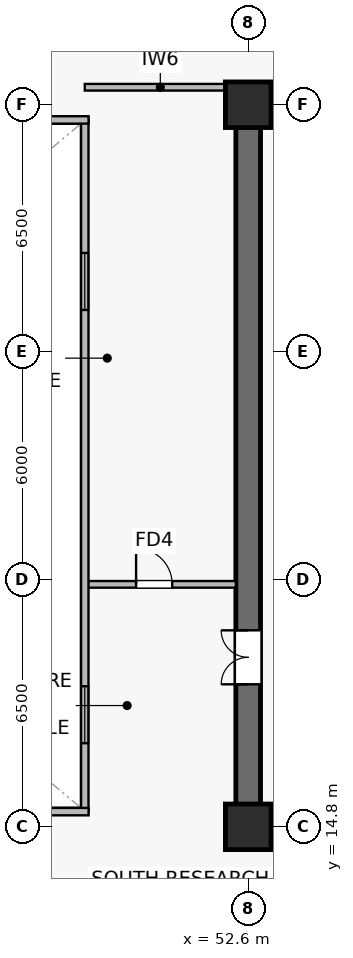
"""IFC4 building model, lengths in metres.
Left out: names, types, materials, properties, quantities, classifications, styles, units other than length and angle.
Written with IfcOpenShell. Run it as: python <this file> out.ifc"""

import sys

from ifc_helpers import new_model, si_unit, direction, frame, frame_2d, origin, origin_2d, place, context, subcontext, project, spatial, rectangle, extrude, source, transform, mapped, element, fill, save


model = new_model("IFC4")
c1 = context("Model", 3, precision=1e-05, world=origin(), true_north=direction((0.0, 1.0)))
c2 = subcontext(c1, "Body", "Model", "MODEL_VIEW")
j1 = project(units=[si_unit("LENGTHUNIT", "METRE"), si_unit("PLANEANGLEUNIT", "RADIAN")], contexts=[c1])
p1 = place(None, origin())
s1 = spatial("IfcSite", under=j1, at=p1, CompositionType="ELEMENT")
p2 = place(p1, origin())
s2 = spatial("IfcBuilding", under=s1, at=p2, CompositionType="ELEMENT")
p3 = place(p2, frame((0.0, 0.0, 174.8)))
s3 = spatial("IfcBuildingStorey", under=s2, at=p3, CompositionType="ELEMENT", Elevation=174.8)
p4 = place(p3, frame((52.275, 14.8, 0.0), z_axis=(0.0, 0.0, 1.0), x_axis=(1.0, 0.0, 0.0)))
e1 = element("IfcWall", 1, at=p4, inside=s3, PredefinedType="SHEAR", context=c2, shape_type="SweptSolid", body=[
    extrude(rectangle(XDim=15.45, YDim=0.65, at=frame_2d((7.725, 0.0))), origin(), (0.0, 0.0, 1.0), 3.79),
])
p5 = place(p3, frame((52.275, 33.8, 0.0), z_axis=(0.0, 0.0, 1.0), x_axis=(1.0, 0.0, 0.0)))
e2 = element("IfcWall", 2, at=p5, inside=s3, PredefinedType="SHEAR", context=c2, shape_type="SweptSolid", body=[
    extrude(rectangle(XDim=15.45, YDim=0.65, at=frame_2d((7.725, 0.0))), origin(), (0.0, 0.0, 1.0), 3.79),
])
p6 = place(p5, frame((6.125, 0.0, 0.0)))
e3 = element("IfcOpeningElement", 3, at=p6, cuts=e2, PredefinedType="OPENING", context=c2, shape_type="SweptSolid", body=[
    extrude(rectangle(XDim=0.95, YDim=2.15, at=frame_2d((0.475, 1.075))), frame((0.0, 0.335, 0.0), z_axis=(0.0, -1.0, 0.0), x_axis=(1.0, 0.0, 0.0)), (0.0, 0.0, 1.0), 0.67),
])
p7 = place(p5, frame((2.585, 0.0, 0.0)))
e4 = element("IfcOpeningElement", 4, at=p7, cuts=e2, PredefinedType="OPENING", context=c2, shape_type="SweptSolid", body=[
    extrude(rectangle(XDim=0.95, YDim=2.15, at=frame_2d((0.475, 1.075))), frame((0.0, 0.335, 0.0), z_axis=(0.0, -1.0, 0.0), x_axis=(1.0, 0.0, 0.0)), (0.0, 0.0, 1.0), 0.67),
])
p8 = place(p3, frame((52.6, 15.125, 0.0), z_axis=(0.0, 0.0, 1.0), x_axis=(0.0, 1.0, 0.0)))
e5 = element("IfcWall", 5, at=p8, inside=s3, PredefinedType="SHEAR", context=c2, shape_type="SweptSolid", body=[
    extrude(rectangle(XDim=18.35, YDim=0.65, at=frame_2d((9.175, 0.0))), origin(), (0.0, 0.0, 1.0), 3.79),
])
p9 = place(p8, frame((3.425, 0.0, 0.0)))
e6 = element("IfcOpeningElement", 6, at=p9, cuts=e5, PredefinedType="OPENING", context=c2, shape_type="SweptSolid", body=[
    extrude(rectangle(XDim=1.42, YDim=2.2, at=frame_2d((0.71, 1.1))), frame((0.0, 0.335, 0.0), z_axis=(0.0, -1.0, 0.0), x_axis=(1.0, 0.0, 0.0)), (0.0, 0.0, 1.0), 0.67),
])
m1 = source(origin(), c2, "Body", "SweptSolid", [
    extrude(rectangle(XDim=1.2, YDim=1.2, at=origin_2d()), origin(), (0.0, 0.0, 1.0), 4.1),
])
for number, where, z_axis, x_axis in (
    (7, (52.6, 14.8, 0.0), (0.0, 0.0, 1.0), (1.0, 0.0, 0.0)),
    (8, (52.6, 33.8, 0.0), (0.0, 0.0, 1.0), (1.0, 0.0, 0.0)),
):
    element("IfcColumn", number, at=place(p3, frame(where, z_axis=z_axis, x_axis=x_axis)), inside=s3, PredefinedType="COLUMN", context=c2, shape_type="MappedRepresentation", body=[
        mapped(m1, transform((0.0, 0.0, 0.0), scale=1.0)),
    ])
p10 = place(p3, frame((48.3, 34.26, 0.0), z_axis=(0.0, 0.0, 1.0), x_axis=(1.0, 0.0, 0.0)))
e9 = element("IfcWall", 9, at=p10, inside=s3, PredefinedType="PARTITIONING", context=c2, shape_type="SweptSolid", body=[
    extrude(rectangle(XDim=3.975, YDim=0.175, at=frame_2d((1.987, 0.0))), origin(), (0.0, 0.0, 1.0), 3.475),
])
p11 = place(p3, frame((48.3, 21.18, 0.0), z_axis=(0.0, 0.0, 1.0), x_axis=(1.0, 0.0, 0.0)))
e10 = element("IfcWall", 10, at=p11, inside=s3, PredefinedType="PARTITIONING", context=c2, shape_type="SweptSolid", body=[
    extrude(rectangle(XDim=3.975, YDim=0.175, at=frame_2d((1.987, 0.0))), origin(), (0.0, 0.0, 1.0), 3.79),
])
p12 = place(p11, frame((1.35, 0.0, 0.0)))
e11 = element("IfcOpeningElement", 11, at=p12, cuts=e10, PredefinedType="OPENING", context=c2, shape_type="SweptSolid", body=[
    extrude(rectangle(XDim=0.95, YDim=2.15, at=frame_2d((0.475, 1.075))), frame((0.0, 0.098, 0.0), z_axis=(0.0, -1.0, 0.0), x_axis=(1.0, 0.0, 0.0)), (0.0, 0.0, 1.0), 0.195),
])
p13 = place(p3, frame((48.3, 15.2, 0.0), z_axis=(0.0, 0.0, 1.0), x_axis=(0.0, 1.0, 0.0)))
e12 = element("IfcWall", 12, at=p13, inside=s3, PredefinedType="SOLIDWALL", context=c2, shape_type="SweptSolid", body=[
    extrude(rectangle(XDim=18.2, YDim=0.195, at=frame_2d((9.1, 0.0))), origin(), (0.0, 0.0, 1.0), 3.79),
])
p14 = place(p13, frame((1.8, 0.0, 0.9)))
e13 = element("IfcOpeningElement", 13, at=p14, cuts=e12, PredefinedType="OPENING", context=c2, shape_type="SweptSolid", body=[
    extrude(rectangle(XDim=1.5, YDim=1.4, at=frame_2d((0.75, 0.7))), frame((0.0, 0.107, 0.0), z_axis=(0.0, -1.0, 0.0), x_axis=(1.0, 0.0, 0.0)), (0.0, 0.0, 1.0), 0.215),
])
p15 = place(p13, frame((13.2, 0.0, 0.9)))
e14 = element("IfcOpeningElement", 14, at=p15, cuts=e12, PredefinedType="OPENING", context=c2, shape_type="SweptSolid", body=[
    extrude(rectangle(XDim=1.5, YDim=1.4, at=frame_2d((0.75, 0.7))), frame((0.0, 0.107, 0.0), z_axis=(0.0, -1.0, 0.0), x_axis=(1.0, 0.0, 0.0)), (0.0, 0.0, 1.0), 0.215),
])
for number, where, z_axis, x_axis in (
    (15, (26.4, 15.2, 0.0), (0.0, 0.0, 1.0), (1.0, 0.0, 0.0)),
    (16, (26.4, 33.4, 0.0), (0.0, 0.0, 1.0), (1.0, 0.0, 0.0)),
):
    element("IfcWall", number, at=place(p3, frame(where, z_axis=z_axis, x_axis=x_axis)), inside=s3, PredefinedType="SOLIDWALL", context=c2, shape_type="SweptSolid", body=[
        extrude(rectangle(XDim=22.0, YDim=0.195, at=frame_2d((11.0, 0.0))), origin(), (0.0, 0.0, 1.0), 3.79),
    ])
m2 = source(origin(), c2, "Body", "SweptSolid", [
    extrude(rectangle(XDim=1.5, YDim=1.4, at=frame_2d((0.75, 0.7))), frame((0.0, 0.03, 0.0), z_axis=(0.0, -1.0, 0.0), x_axis=(1.0, 0.0, 0.0)), (0.0, 0.0, 1.0), 0.06),
])
p16 = place(p14, origin())
e17 = element("IfcWindow", 17, at=p16, inside=s3, PartitioningType="SINGLE_PANEL", PredefinedType="WINDOW", context=c2, shape_type="MappedRepresentation", body=[
    mapped(m2, transform((0.0, 0.0, 0.0), scale=1.0)),
])
fill(e13, e17)
p17 = place(p15, origin())
e18 = element("IfcWindow", 18, at=p17, inside=s3, PartitioningType="SINGLE_PANEL", PredefinedType="WINDOW", context=c2, shape_type="MappedRepresentation", body=[
    mapped(m2, transform((0.0, 0.0, 0.0), scale=1.0)),
])
fill(e14, e18)
m3 = source(origin(), c2, "Body", "SweptSolid", [
    extrude(rectangle(XDim=1.42, YDim=2.2, at=frame_2d((0.71, 1.1))), frame((0.0, 0.025, 0.0), z_axis=(0.0, -1.0, 0.0), x_axis=(1.0, 0.0, 0.0)), (0.0, 0.0, 1.0), 0.05),
])
p18 = place(p9, origin())
e19 = element("IfcDoor", 19, at=p18, inside=s3, OperationType="DOUBLE_DOOR_SINGLE_SWING", PredefinedType="DOOR", context=c2, shape_type="MappedRepresentation", body=[
    mapped(m3, transform((0.0, 0.0, 0.0), scale=1.0)),
])
fill(e6, e19)
m4 = source(origin(), c2, "Body", "SweptSolid", [
    extrude(rectangle(XDim=0.95, YDim=2.15, at=frame_2d((0.475, 1.075))), frame((0.0, 0.025, 0.0), z_axis=(0.0, -1.0, 0.0), x_axis=(1.0, 0.0, 0.0)), (0.0, 0.0, 1.0), 0.05),
])
p19 = place(p12, origin())
e20 = element("IfcDoor", 20, at=p19, inside=s3, OperationType="SINGLE_SWING_LEFT", PredefinedType="DOOR", context=c2, shape_type="MappedRepresentation", body=[
    mapped(m4, transform((0.0, 0.0, 0.0), scale=1.0)),
])
fill(e11, e20)
save(model, sys.argv[1])
